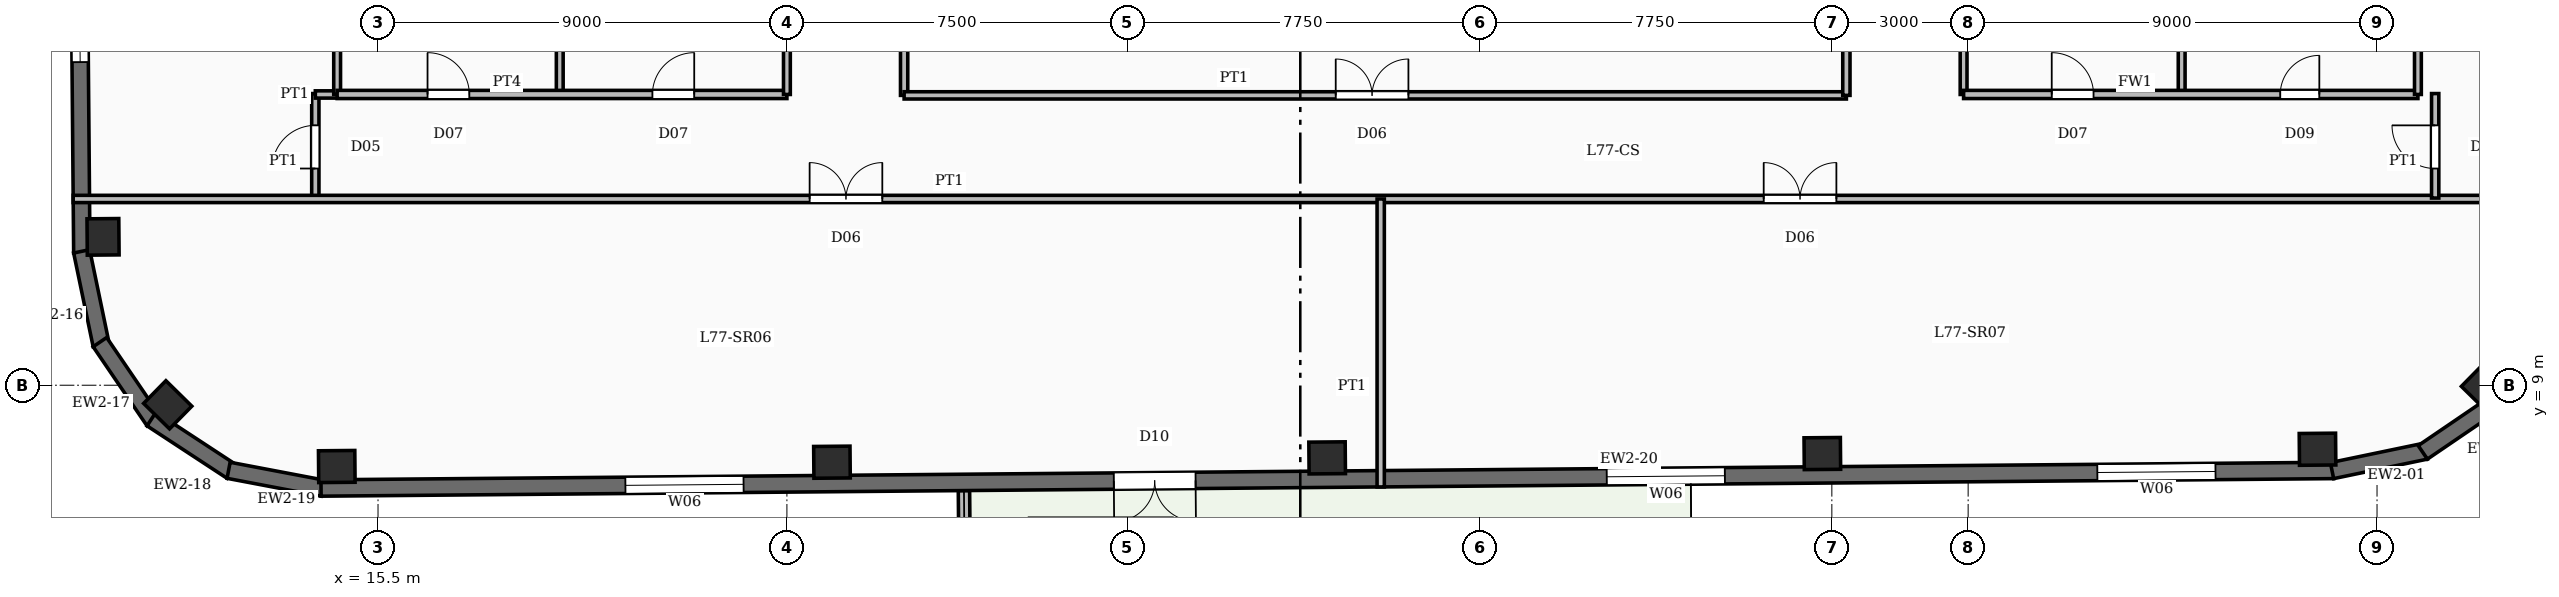
"""IFC4 building model, lengths in metres.
Left out: names, types, materials, properties, quantities, classifications, styles, units other than length and angle.
Written with IfcOpenShell. Run it as: python <this file> out.ifc"""

import sys

from ifc_helpers import new_model, si_unit, direction, frame, frame_2d, origin, origin_2d, place, context, subcontext, project, spatial, rectangle, extrude, element, fill, save


model = new_model("IFC4")
c1 = context("Model", 3, precision=1e-05, world=origin(), true_north=direction((0.0, 1.0)))
c2 = subcontext(c1, "Body", "Model", "MODEL_VIEW")
j1 = project(units=[si_unit("LENGTHUNIT", "METRE"), si_unit("PLANEANGLEUNIT", "RADIAN")], contexts=[c1])
p1 = place(None, origin())
s1 = spatial("IfcSite", under=j1, at=p1, CompositionType="ELEMENT")
p2 = place(p1, origin())
s2 = spatial("IfcBuilding", under=s1, at=p2, CompositionType="ELEMENT")
p3 = place(p2, frame((0.0, 0.0, 312.4)))
s3 = spatial("IfcBuildingStorey", under=s2, at=p3, CompositionType="ELEMENT", Elevation=312.4)
for number, where, z_axis, x_axis in (
    (1, (14.592, 7.211, -0.24), (0.0, 0.0, 1.0), (1.0, 0.009, 0.0)),
    (2, (25.491, 7.306, -0.24), (0.0, 0.0, 1.0), (1.0, 0.009, 0.0)),
    (3, (36.391, 7.401, -0.24), (0.0, 0.0, 1.0), (1.0, 0.009, 0.0)),
    (4, (47.291, 7.496, -0.24), (0.0, 0.0, 1.0), (1.0, 0.009, 0.0)),
    (5, (58.19, 7.591, -0.24), (0.0, 0.0, 1.0), (1.0, 0.009, 0.0)),
    (6, (61.887, 9.015, -0.24), (0.0, 0.0, 1.0), (0.701, 0.713, 0.0)),
    (7, (9.448, 12.266, -0.24), (0.0, 0.0, 1.0), (-0.009, 1.0, 0.0)),
    (8, (10.871, 8.569, -0.24), (0.0, 0.0, 1.0), (-0.713, 0.701, 0.0)),
):
    element("IfcColumn", number, at=place(p3, frame(where, z_axis=z_axis, x_axis=x_axis)), inside=s3, PredefinedType="COLUMN", context=c2, shape_type="SweptSolid", body=[
        extrude(rectangle(XDim=0.8, YDim=0.7, at=origin_2d()), origin(), (0.0, 0.0, 1.0), 4.8),
    ])
p4 = place(p3, frame((60.572, 7.549, 0.0), z_axis=(0.0, 0.0, 1.0), x_axis=(-0.979059388908, -0.203574833883, 0.0)))
e9 = element("IfcWall", 9, at=p4, inside=s3, PredefinedType="SOLIDWALL", context=c2, shape_type="SweptSolid", body=[
    extrude(rectangle(XDim=2.107, YDim=0.36, at=frame_2d((1.054, 0.0))), origin(), (0.0, 0.0, 1.0), 4.56),
])
p5 = place(p3, frame((62.249, 8.708, 0.0), z_axis=(0.0, 0.0, 1.0), x_axis=(-0.826572866302, -0.562829722645, 0.0)))
e10 = element("IfcWall", 10, at=p5, inside=s3, PredefinedType="SOLIDWALL", context=c2, shape_type="SweptSolid", body=[
    extrude(rectangle(XDim=2.107, YDim=0.36, at=frame_2d((1.053, 0.0))), origin(), (0.0, 0.0, 1.0), 4.56),
])
p6 = place(p3, frame((8.981, 11.912, 0.0), z_axis=(0.0, 0.0, 1.0), x_axis=(-0.008726453825, 0.999961923777, 0.0)))
e11 = element("IfcWall", 11, at=p6, inside=s3, PredefinedType="SOLIDWALL", context=c2, shape_type="SweptSolid", body=[
    extrude(rectangle(XDim=34.3, YDim=0.36, at=frame_2d((17.15, 0.0))), origin(), (0.0, 0.0, 1.0), 4.56),
])
p7 = place(p6, frame((4.2, 0.0, 0.88)))
e12 = element("IfcOpeningElement", 12, at=p7, cuts=e11, PredefinedType="OPENING", context=c2, shape_type="SweptSolid", body=[
    extrude(rectangle(XDim=1.35, YDim=2.2, at=frame_2d((0.675, 1.1))), frame((0.0, 0.19, 0.0), z_axis=(0.0, -1.0, 0.0), x_axis=(1.0, 0.0, 0.0)), (0.0, 0.0, 1.0), 0.38),
])
p8 = place(p6, frame((15.4, 0.0, 0.88)))
e13 = element("IfcOpeningElement", 13, at=p8, cuts=e11, PredefinedType="OPENING", context=c2, shape_type="SweptSolid", body=[
    extrude(rectangle(XDim=1.35, YDim=2.2, at=frame_2d((0.675, 1.1))), frame((0.0, 0.19, 0.0), z_axis=(0.0, -1.0, 0.0), x_axis=(1.0, 0.0, 0.0)), (0.0, 0.0, 1.0), 0.38),
])
p9 = place(p6, frame((26.6, 0.0, 0.88)))
e14 = element("IfcOpeningElement", 14, at=p9, cuts=e11, PredefinedType="OPENING", context=c2, shape_type="SweptSolid", body=[
    extrude(rectangle(XDim=1.35, YDim=2.2, at=frame_2d((0.675, 1.1))), frame((0.0, 0.19, 0.0), z_axis=(0.0, -1.0, 0.0), x_axis=(1.0, 0.0, 0.0)), (0.0, 0.0, 1.0), 0.38),
])
p10 = place(p3, frame((9.406, 9.884, 0.0), z_axis=(0.0, 0.0, 1.0), x_axis=(-0.203685893209, 0.979036289883, 0.0)))
e15 = element("IfcWall", 15, at=p10, inside=s3, PredefinedType="SOLIDWALL", context=c2, shape_type="SweptSolid", body=[
    extrude(rectangle(XDim=2.107, YDim=0.36, at=frame_2d((1.054, 0.0))), origin(), (0.0, 0.0, 1.0), 4.56),
])
for number, where, z_axis, x_axis in (
    (16, (10.564, 8.207, 0.0), (0.0, 0.0, 1.0), (-0.563, 0.827, 0.0)),
    (17, (12.276, 7.101, 0.0), (0.0, 0.0, 1.0), (-0.836, 0.548, 0.0)),
):
    element("IfcWall", number, at=place(p3, frame(where, z_axis=z_axis, x_axis=x_axis)), inside=s3, PredefinedType="SOLIDWALL", context=c2, shape_type="SweptSolid", body=[
        extrude(rectangle(XDim=2.107, YDim=0.36, at=frame_2d((1.053, 0.0))), origin(), (0.0, 0.0, 1.0), 4.56),
    ])
p11 = place(p3, frame((14.281, 6.734, 0.0), z_axis=(0.0, 0.0, 1.0), x_axis=(-0.982445905584, 0.186547695246, 0.0)))
e18 = element("IfcWall", 18, at=p11, inside=s3, PredefinedType="SOLIDWALL", context=c2, shape_type="SweptSolid", body=[
    extrude(rectangle(XDim=2.107, YDim=0.36, at=frame_2d((1.054, 0.0))), origin(), (0.0, 0.0, 1.0), 4.56),
])
p12 = place(p3, frame((58.544, 7.124, 0.0), z_axis=(0.0, 0.0, 1.0), x_axis=(-0.999961896442, -0.008729585516, 0.0)))
e19 = element("IfcWall", 19, at=p12, inside=s3, PredefinedType="SOLIDWALL", context=c2, shape_type="SweptSolid", body=[
    extrude(rectangle(XDim=44.3, YDim=0.36, at=frame_2d((22.15, 0.0))), origin(), (0.0, 0.0, 1.0), 4.56),
])
p13 = place(p12, frame((25.05, 0.0, 0.0)))
e20 = element("IfcOpeningElement", 20, at=p13, cuts=e19, PredefinedType="OPENING", context=c2, shape_type="SweptSolid", body=[
    extrude(rectangle(XDim=1.8, YDim=2.25, at=frame_2d((0.9, 1.125))), frame((0.0, 0.19, 0.0), z_axis=(0.0, -1.0, 0.0), x_axis=(1.0, 0.0, 0.0)), (0.0, 0.0, 1.0), 0.38),
])
p14 = place(p12, frame((2.6, 0.0, 0.8)))
e21 = element("IfcOpeningElement", 21, at=p14, cuts=e19, PredefinedType="OPENING", context=c2, shape_type="SweptSolid", body=[
    extrude(rectangle(XDim=2.6, YDim=3.2, at=frame_2d((1.3, 1.6))), frame((0.0, 0.19, 0.0), z_axis=(0.0, -1.0, 0.0), x_axis=(1.0, 0.0, 0.0)), (0.0, 0.0, 1.0), 0.38),
])
p15 = place(p12, frame((13.4, 0.0, 0.8)))
e22 = element("IfcOpeningElement", 22, at=p15, cuts=e19, PredefinedType="OPENING", context=c2, shape_type="SweptSolid", body=[
    extrude(rectangle(XDim=2.6, YDim=3.2, at=frame_2d((1.3, 1.6))), frame((0.0, 0.19, 0.0), z_axis=(0.0, -1.0, 0.0), x_axis=(1.0, 0.0, 0.0)), (0.0, 0.0, 1.0), 0.38),
])
p16 = place(p12, frame((35.0, 0.0, 0.8)))
e23 = element("IfcOpeningElement", 23, at=p16, cuts=e19, PredefinedType="OPENING", context=c2, shape_type="SweptSolid", body=[
    extrude(rectangle(XDim=2.6, YDim=3.2, at=frame_2d((1.3, 1.6))), frame((0.0, 0.19, 0.0), z_axis=(0.0, -1.0, 0.0), x_axis=(1.0, 0.0, 0.0)), (0.0, 0.0, 1.0), 0.38),
])
p17 = place(p3, frame((28.397, 6.681, 0.0), z_axis=(0.0, 0.0, 1.0), x_axis=(0.00864667573, -0.999962616801, 0.0)))
e24 = element("IfcWall", 24, at=p17, inside=s3, PredefinedType="PARAPET", context=c2, shape_type="SweptSolid", body=[
    extrude(rectangle(XDim=2.4, YDim=0.25, at=frame_2d((1.2, 0.0))), origin(), (0.0, 0.0, 1.0), 1.12),
])
p18 = place(p3, frame((19.5, 15.4, 0.0), z_axis=(0.0, 0.0, 1.0), x_axis=(0.0, 1.0, 0.0)))
e25 = element("IfcWall", 25, at=p18, inside=s3, PredefinedType="PARTITIONING", context=c2, shape_type="SweptSolid", body=[
    extrude(rectangle(XDim=3.58, YDim=0.15, at=frame_2d((1.79, 0.0))), origin(), (0.0, 0.0, 1.0), 3.62),
])
p19 = place(p3, frame((14.6, 15.4, 0.0), z_axis=(0.0, 0.0, 1.0), x_axis=(1.0, 0.0, 0.0)))
e26 = element("IfcWall", 26, at=p19, inside=s3, PredefinedType="PARTITIONING", context=c2, shape_type="SweptSolid", body=[
    extrude(rectangle(XDim=9.9, YDim=0.18, at=frame_2d((4.95, 0.0))), origin(), (0.0, 0.0, 1.0), 3.62),
])
p20 = place(p19, frame((1.99, 0.0, 0.0)))
e27 = element("IfcOpeningElement", 27, at=p20, cuts=e26, PredefinedType="OPENING", context=c2, shape_type="SweptSolid", body=[
    extrude(rectangle(XDim=0.92, YDim=2.1, at=frame_2d((0.46, 1.05))), frame((0.0, 0.1, 0.0), z_axis=(0.0, -1.0, 0.0), x_axis=(1.0, 0.0, 0.0)), (0.0, 0.0, 1.0), 0.2),
])
p21 = place(p19, frame((6.94, 0.0, 0.0)))
e28 = element("IfcOpeningElement", 28, at=p21, cuts=e26, PredefinedType="OPENING", context=c2, shape_type="SweptSolid", body=[
    extrude(rectangle(XDim=0.92, YDim=2.1, at=frame_2d((0.46, 1.05))), frame((0.0, 0.1, 0.0), z_axis=(0.0, -1.0, 0.0), x_axis=(1.0, 0.0, 0.0)), (0.0, 0.0, 1.0), 0.2),
])
for number, where, z_axis, x_axis in (
    (29, (14.6, 15.4, 0.0), (0.0, 0.0, 1.0), (0.0, 1.0, 0.0)),
    (30, (24.5, 15.4, 0.0), (0.0, 0.0, 1.0), (0.0, 1.0, 0.0)),
    (31, (55.2, 15.4, 0.0), (0.0, 0.0, 1.0), (0.0, 1.0, 0.0)),
):
    element("IfcWall", number, at=place(p3, frame(where, z_axis=z_axis, x_axis=x_axis)), inside=s3, PredefinedType="PARTITIONING", context=c2, shape_type="SweptSolid", body=[
        extrude(rectangle(XDim=3.58, YDim=0.15, at=frame_2d((1.79, 0.0))), origin(), (0.0, 0.0, 1.0), 3.62),
    ])
p22 = place(p3, frame((50.4, 15.4, 0.0), z_axis=(0.0, 0.0, 1.0), x_axis=(1.0, 0.0, 0.0)))
e32 = element("IfcWall", 32, at=p22, inside=s3, PredefinedType="SOLIDWALL", context=c2, shape_type="SweptSolid", body=[
    extrude(rectangle(XDim=10.0, YDim=0.18, at=frame_2d((5.0, 0.0))), origin(), (0.0, 0.0, 1.0), 3.62),
])
p23 = place(p22, frame((1.94, 0.0, 0.0)))
e33 = element("IfcOpeningElement", 33, at=p23, cuts=e32, PredefinedType="OPENING", context=c2, shape_type="SweptSolid", body=[
    extrude(rectangle(XDim=0.92, YDim=2.1, at=frame_2d((0.46, 1.05))), frame((0.0, 0.1, 0.0), z_axis=(0.0, -1.0, 0.0), x_axis=(1.0, 0.0, 0.0)), (0.0, 0.0, 1.0), 0.2),
])
p24 = place(p22, frame((6.97, 0.0, 0.0)))
e34 = element("IfcOpeningElement", 34, at=p24, cuts=e32, PredefinedType="OPENING", context=c2, shape_type="SweptSolid", body=[
    extrude(rectangle(XDim=0.86, YDim=2.05, at=frame_2d((0.43, 1.025))), frame((0.0, 0.1, 0.0), z_axis=(0.0, -1.0, 0.0), x_axis=(1.0, 0.0, 0.0)), (0.0, 0.0, 1.0), 0.2),
])
for number, where, z_axis, x_axis in (
    (35, (50.4, 15.4, 0.0), (0.0, 0.0, 1.0), (0.0, 1.0, 0.0)),
    (36, (60.4, 15.4, 0.0), (0.0, 0.0, 1.0), (0.0, 1.0, 0.0)),
):
    element("IfcWall", number, at=place(p3, frame(where, z_axis=z_axis, x_axis=x_axis)), inside=s3, PredefinedType="PARTITIONING", context=c2, shape_type="SweptSolid", body=[
        extrude(rectangle(XDim=3.58, YDim=0.15, at=frame_2d((1.79, 0.0))), origin(), (0.0, 0.0, 1.0), 3.62),
    ])
p25 = place(p3, frame((27.08, 15.38, 0.0), z_axis=(0.0, 0.0, 1.0), x_axis=(1.0, 0.0, 0.0)))
e37 = element("IfcWall", 37, at=p25, inside=s3, PredefinedType="PARTITIONING", context=c2, shape_type="SweptSolid", body=[
    extrude(rectangle(XDim=20.74, YDim=0.16, at=frame_2d((10.37, 0.0))), origin(), (0.0, 0.0, 1.0), 3.62),
])
p26 = place(p25, frame((9.5, 0.0, 0.0)))
e38 = element("IfcOpeningElement", 38, at=p26, cuts=e37, PredefinedType="OPENING", context=c2, shape_type="SweptSolid", body=[
    extrude(rectangle(XDim=1.6, YDim=2.15, at=frame_2d((0.8, 1.075))), frame((0.0, 0.09, 0.0), z_axis=(0.0, -1.0, 0.0), x_axis=(1.0, 0.0, 0.0)), (0.0, 0.0, 1.0), 0.18),
])
for number, where, z_axis, x_axis in (
    (39, (27.08, 15.38, 0.0), (0.0, 0.0, 1.0), (0.0, 1.0, 0.0)),
    (40, (47.82, 15.38, 0.0), (0.0, 0.0, 1.0), (0.0, 1.0, 0.0)),
):
    element("IfcWall", number, at=place(p3, frame(where, z_axis=z_axis, x_axis=x_axis)), inside=s3, PredefinedType="PARTITIONING", context=c2, shape_type="SweptSolid", body=[
        extrude(rectangle(XDim=19.2, YDim=0.16, at=frame_2d((9.6, 0.0))), origin(), (0.0, 0.0, 1.0), 3.62),
    ])
p27 = place(p3, frame((14.12, 15.4, 0.0), z_axis=(0.0, 0.0, 1.0), x_axis=(1.0, 0.0, 0.0)))
e41 = element("IfcWall", 41, at=p27, inside=s3, PredefinedType="PARTITIONING", context=c2, shape_type="SweptSolid", body=[
    extrude(rectangle(XDim=0.5, YDim=0.16, at=frame_2d((0.25, 0.0))), origin(), (0.0, 0.0, 1.0), 3.62),
])
p28 = place(p3, frame((8.79, 13.1, 0.0), z_axis=(0.0, 0.0, 1.0), x_axis=(1.0, 0.0, 0.0)))
e42 = element("IfcWall", 42, at=p28, inside=s3, PredefinedType="PARTITIONING", context=c2, shape_type="SweptSolid", body=[
    extrude(rectangle(XDim=55.102, YDim=0.16, at=frame_2d((27.551, 0.0))), origin(), (0.0, 0.0, 1.0), 3.62),
])
p29 = place(p28, frame((16.21, 0.0, 0.0)))
e43 = element("IfcOpeningElement", 43, at=p29, cuts=e42, PredefinedType="OPENING", context=c2, shape_type="SweptSolid", body=[
    extrude(rectangle(XDim=1.6, YDim=2.15, at=frame_2d((0.8, 1.075))), frame((0.0, 0.09, 0.0), z_axis=(0.0, -1.0, 0.0), x_axis=(1.0, 0.0, 0.0)), (0.0, 0.0, 1.0), 0.18),
])
p30 = place(p28, frame((37.21, 0.0, 0.0)))
e44 = element("IfcOpeningElement", 44, at=p30, cuts=e42, PredefinedType="OPENING", context=c2, shape_type="SweptSolid", body=[
    extrude(rectangle(XDim=1.6, YDim=2.15, at=frame_2d((0.8, 1.075))), frame((0.0, 0.09, 0.0), z_axis=(0.0, -1.0, 0.0), x_axis=(1.0, 0.0, 0.0)), (0.0, 0.0, 1.0), 0.18),
])
p31 = place(p3, frame((37.57, 6.761, 0.0), z_axis=(0.0, 0.0, 1.0), x_axis=(0.0, 1.0, 0.0)))
e45 = element("IfcWall", 45, at=p31, inside=s3, PredefinedType="PARTITIONING", context=c2, shape_type="SweptSolid", body=[
    extrude(rectangle(XDim=6.339, YDim=0.16, at=frame_2d((3.169, 0.0))), origin(), (0.0, 0.0, 1.0), 3.62),
])
p32 = place(p3, frame((14.12, 13.12, 0.0), z_axis=(0.0, 0.0, 1.0), x_axis=(0.0, 1.0, 0.0)))
e46 = element("IfcWall", 46, at=p32, inside=s3, PredefinedType="PARTITIONING", context=c2, shape_type="SweptSolid", body=[
    extrude(rectangle(XDim=2.3, YDim=0.16, at=frame_2d((1.15, 0.0))), origin(), (0.0, 0.0, 1.0), 3.62),
])
p33 = place(p32, frame((0.65, 0.0, 0.0)))
e47 = element("IfcOpeningElement", 47, at=p33, cuts=e46, PredefinedType="OPENING", context=c2, shape_type="SweptSolid", body=[
    extrude(rectangle(XDim=0.95, YDim=2.15, at=frame_2d((0.475, 1.075))), frame((0.0, 0.09, 0.0), z_axis=(0.0, -1.0, 0.0), x_axis=(1.0, 0.0, 0.0)), (0.0, 0.0, 1.0), 0.18),
])
p34 = place(p3, frame((60.78, 13.12, 0.0), z_axis=(0.0, 0.0, 1.0), x_axis=(0.0, 1.0, 0.0)))
e48 = element("IfcWall", 48, at=p34, inside=s3, PredefinedType="PARTITIONING", context=c2, shape_type="SweptSolid", body=[
    extrude(rectangle(XDim=2.3, YDim=0.16, at=frame_2d((1.15, 0.0))), origin(), (0.0, 0.0, 1.0), 3.62),
])
p35 = place(p34, frame((0.65, 0.0, 0.0)))
e49 = element("IfcOpeningElement", 49, at=p35, cuts=e48, PredefinedType="OPENING", context=c2, shape_type="SweptSolid", body=[
    extrude(rectangle(XDim=0.95, YDim=2.15, at=frame_2d((0.475, 1.075))), frame((0.0, 0.09, 0.0), z_axis=(0.0, -1.0, 0.0), x_axis=(1.0, 0.0, 0.0)), (0.0, 0.0, 1.0), 0.18),
])
p36 = place(p7, origin())
e50 = element("IfcWindow", 50, at=p36, inside=s3, PartitioningType="SINGLE_PANEL", PredefinedType="WINDOW", context=c2, shape_type="SweptSolid", body=[
    extrude(rectangle(XDim=1.35, YDim=2.2, at=frame_2d((0.675, 1.1))), frame((0.0, 0.03, 0.0), z_axis=(0.0, -1.0, 0.0), x_axis=(1.0, 0.0, 0.0)), (0.0, 0.0, 1.0), 0.06),
])
fill(e12, e50)
p37 = place(p13, origin())
e51 = element("IfcDoor", 51, at=p37, inside=s3, OperationType="DOUBLE_DOOR_SINGLE_SWING", PredefinedType="DOOR", context=c2, shape_type="SweptSolid", body=[
    extrude(rectangle(XDim=1.8, YDim=2.25, at=frame_2d((0.9, 1.125))), frame((0.0, 0.025, 0.0), z_axis=(0.0, -1.0, 0.0), x_axis=(1.0, 0.0, 0.0)), (0.0, 0.0, 1.0), 0.05),
])
fill(e20, e51)
p38 = place(p14, origin())
e52 = element("IfcWindow", 52, at=p38, inside=s3, PartitioningType="DOUBLE_PANEL_VERTICAL", PredefinedType="WINDOW", context=c2, shape_type="SweptSolid", body=[
    extrude(rectangle(XDim=2.6, YDim=3.2, at=frame_2d((1.3, 1.6))), frame((0.0, 0.03, 0.0), z_axis=(0.0, -1.0, 0.0), x_axis=(1.0, 0.0, 0.0)), (0.0, 0.0, 1.0), 0.06),
])
fill(e21, e52)
p39 = place(p15, origin())
e53 = element("IfcWindow", 53, at=p39, inside=s3, PartitioningType="DOUBLE_PANEL_VERTICAL", PredefinedType="WINDOW", context=c2, shape_type="SweptSolid", body=[
    extrude(rectangle(XDim=2.6, YDim=3.2, at=frame_2d((1.3, 1.6))), frame((0.0, 0.03, 0.0), z_axis=(0.0, -1.0, 0.0), x_axis=(1.0, 0.0, 0.0)), (0.0, 0.0, 1.0), 0.06),
])
fill(e22, e53)
p40 = place(p16, origin())
e54 = element("IfcWindow", 54, at=p40, inside=s3, PartitioningType="DOUBLE_PANEL_VERTICAL", PredefinedType="WINDOW", context=c2, shape_type="SweptSolid", body=[
    extrude(rectangle(XDim=2.6, YDim=3.2, at=frame_2d((1.3, 1.6))), frame((0.0, 0.03, 0.0), z_axis=(0.0, -1.0, 0.0), x_axis=(1.0, 0.0, 0.0)), (0.0, 0.0, 1.0), 0.06),
])
fill(e23, e54)
p41 = place(p20, origin())
e55 = element("IfcDoor", 55, at=p41, inside=s3, OperationType="SINGLE_SWING_LEFT", PredefinedType="DOOR", context=c2, shape_type="SweptSolid", body=[
    extrude(rectangle(XDim=0.92, YDim=2.1, at=frame_2d((0.46, 1.05))), frame((0.0, 0.025, 0.0), z_axis=(0.0, -1.0, 0.0), x_axis=(1.0, 0.0, 0.0)), (0.0, 0.0, 1.0), 0.05),
])
fill(e27, e55)
p42 = place(p21, origin())
e56 = element("IfcDoor", 56, at=p42, inside=s3, OperationType="SINGLE_SWING_RIGHT", PredefinedType="DOOR", context=c2, shape_type="SweptSolid", body=[
    extrude(rectangle(XDim=0.92, YDim=2.1, at=frame_2d((0.46, 1.05))), frame((0.0, 0.025, 0.0), z_axis=(0.0, -1.0, 0.0), x_axis=(1.0, 0.0, 0.0)), (0.0, 0.0, 1.0), 0.05),
])
fill(e28, e56)
p43 = place(p23, origin())
e57 = element("IfcDoor", 57, at=p43, inside=s3, OperationType="SINGLE_SWING_LEFT", PredefinedType="DOOR", context=c2, shape_type="SweptSolid", body=[
    extrude(rectangle(XDim=0.92, YDim=2.1, at=frame_2d((0.46, 1.05))), frame((0.0, 0.025, 0.0), z_axis=(0.0, -1.0, 0.0), x_axis=(1.0, 0.0, 0.0)), (0.0, 0.0, 1.0), 0.05),
])
fill(e33, e57)
p44 = place(p24, origin())
e58 = element("IfcDoor", 58, at=p44, inside=s3, OperationType="SINGLE_SWING_RIGHT", PredefinedType="DOOR", context=c2, shape_type="SweptSolid", body=[
    extrude(rectangle(XDim=0.86, YDim=2.05, at=frame_2d((0.43, 1.025))), frame((0.0, 0.025, 0.0), z_axis=(0.0, -1.0, 0.0), x_axis=(1.0, 0.0, 0.0)), (0.0, 0.0, 1.0), 0.05),
])
fill(e34, e58)
p45 = place(p26, origin())
e59 = element("IfcDoor", 59, at=p45, inside=s3, OperationType="DOUBLE_DOOR_SINGLE_SWING", PredefinedType="DOOR", context=c2, shape_type="SweptSolid", body=[
    extrude(rectangle(XDim=1.6, YDim=2.15, at=frame_2d((0.8, 1.075))), frame((0.0, 0.025, 0.0), z_axis=(0.0, -1.0, 0.0), x_axis=(1.0, 0.0, 0.0)), (0.0, 0.0, 1.0), 0.05),
])
fill(e38, e59)
p46 = place(p29, origin())
e60 = element("IfcDoor", 60, at=p46, inside=s3, OperationType="DOUBLE_DOOR_SINGLE_SWING", PredefinedType="DOOR", context=c2, shape_type="SweptSolid", body=[
    extrude(rectangle(XDim=1.6, YDim=2.15, at=frame_2d((0.8, 1.075))), frame((0.0, 0.025, 0.0), z_axis=(0.0, -1.0, 0.0), x_axis=(1.0, 0.0, 0.0)), (0.0, 0.0, 1.0), 0.05),
])
fill(e43, e60)
p47 = place(p30, origin())
e61 = element("IfcDoor", 61, at=p47, inside=s3, OperationType="DOUBLE_DOOR_SINGLE_SWING", PredefinedType="DOOR", context=c2, shape_type="SweptSolid", body=[
    extrude(rectangle(XDim=1.6, YDim=2.15, at=frame_2d((0.8, 1.075))), frame((0.0, 0.025, 0.0), z_axis=(0.0, -1.0, 0.0), x_axis=(1.0, 0.0, 0.0)), (0.0, 0.0, 1.0), 0.05),
])
fill(e44, e61)
p48 = place(p33, origin())
e62 = element("IfcDoor", 62, at=p48, inside=s3, OperationType="SINGLE_SWING_LEFT", PredefinedType="DOOR", context=c2, shape_type="SweptSolid", body=[
    extrude(rectangle(XDim=0.95, YDim=2.15, at=frame_2d((0.475, 1.075))), frame((0.0, 0.025, 0.0), z_axis=(0.0, -1.0, 0.0), x_axis=(1.0, 0.0, 0.0)), (0.0, 0.0, 1.0), 0.05),
])
fill(e47, e62)
p49 = place(p35, origin())
e63 = element("IfcDoor", 63, at=p49, inside=s3, OperationType="SINGLE_SWING_RIGHT", PredefinedType="DOOR", context=c2, shape_type="SweptSolid", body=[
    extrude(rectangle(XDim=0.95, YDim=2.15, at=frame_2d((0.475, 1.075))), frame((0.0, 0.025, 0.0), z_axis=(0.0, -1.0, 0.0), x_axis=(1.0, 0.0, 0.0)), (0.0, 0.0, 1.0), 0.05),
])
fill(e49, e63)
save(model, sys.argv[1])
